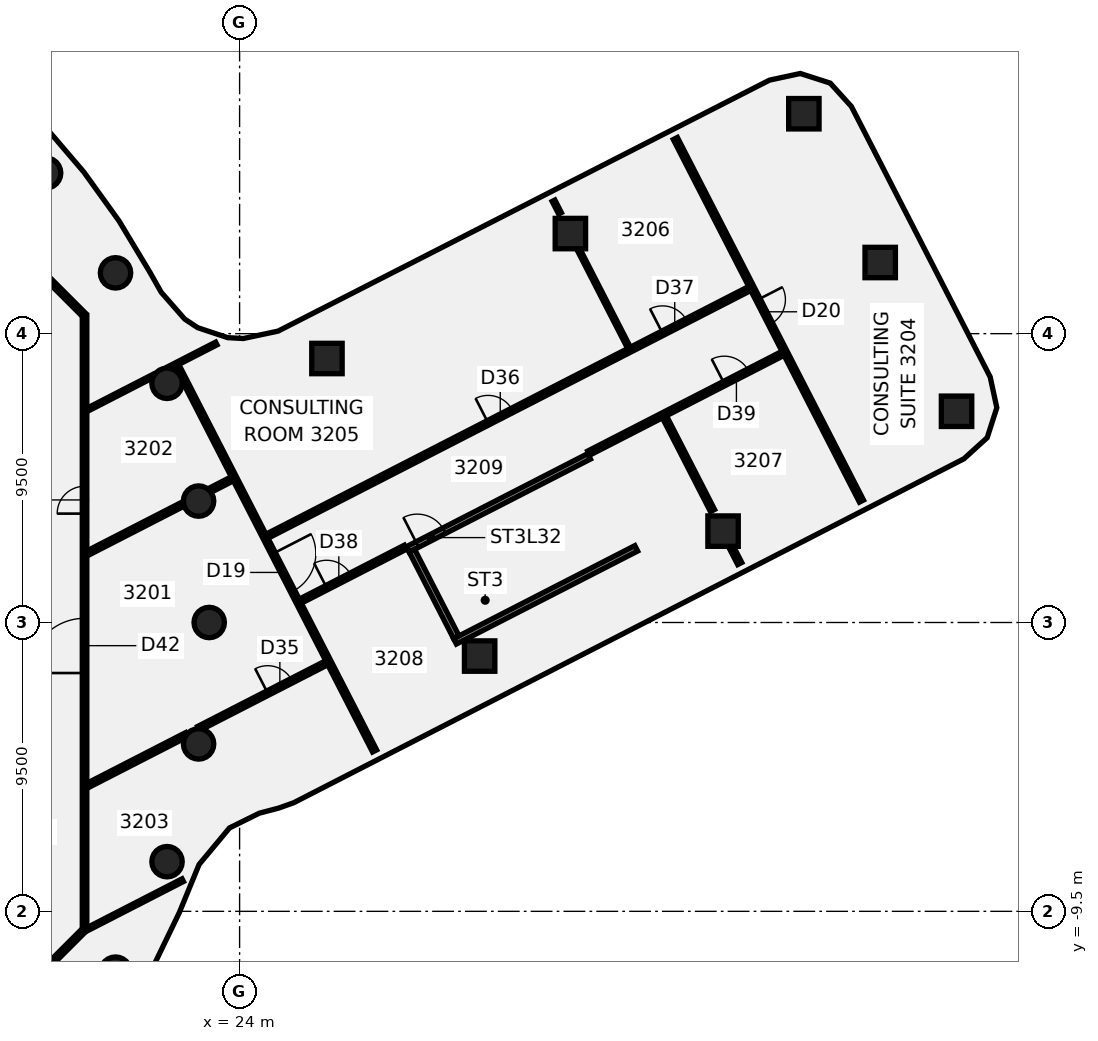
"""IFC4 building model, lengths in metres.
Left out: names, types, materials, properties, quantities, classifications, styles, units other than length and angle.
Written with IfcOpenShell. Run it as: python <this file> out.ifc"""

import sys

from ifc_helpers import new_model, si_unit, direction, frame, frame_2d, origin, origin_2d, place, context, subcontext, project, spatial, polyline, rectangle, circle, outline, extrude, element, fill, save


model = new_model("IFC4")
c1 = context("Model", 3, precision=1e-05, world=origin(), true_north=direction((0.0, 1.0)))
c2 = subcontext(c1, "Body", "Model", "MODEL_VIEW")
j1 = project(units=[si_unit("LENGTHUNIT", "METRE"), si_unit("PLANEANGLEUNIT", "RADIAN")], contexts=[c1])
p1 = place(None, origin())
s1 = spatial("IfcSite", under=j1, at=p1, CompositionType="ELEMENT")
p2 = place(p1, origin())
s2 = spatial("IfcBuilding", under=s1, at=p2, CompositionType="ELEMENT")
p3 = place(p2, frame((0.0, 0.0, 133.0)))
s3 = spatial("IfcBuildingStorey", under=s2, at=p3, CompositionType="ELEMENT", Elevation=133.0)
for number, where, z_axis, x_axis in (
    (1, (23.0, 0.0, -0.14), (0.0, 0.0, 1.0), (1.0, 0.0, 0.0)),
    (2, (22.651, 3.994, -0.14), (0.0, 0.0, 1.0), (1.0, 0.0, 0.0)),
    (3, (21.613, 7.866, -0.14), (0.0, 0.0, 1.0), (1.0, 0.0, 0.0)),
    (4, (19.919, 11.5, -0.14), (0.0, 0.0, 1.0), (1.0, 0.0, 0.0)),
    (5, (17.619, 14.784, -0.14), (0.0, 0.0, 1.0), (1.0, 0.0, 0.0)),
    (6, (19.919, -11.5, -0.14), (0.0, 0.0, 1.0), (1.0, 0.0, 0.0)),
    (7, (21.613, -7.866, -0.14), (0.0, 0.0, 1.0), (1.0, 0.0, 0.0)),
    (8, (22.651, -3.994, -0.14), (0.0, 0.0, 1.0), (1.0, 0.0, 0.0)),
):
    element("IfcColumn", number, at=place(p3, frame(where, z_axis=z_axis, x_axis=x_axis)), inside=s3, PredefinedType="COLUMN", context=c2, shape_type="SweptSolid", body=[
        extrude(circle(Radius=0.5, at=origin_2d()), origin(), (0.0, 0.0, 1.0), 3.75),
    ])
p4 = place(p3, frame((34.88, 12.792, -0.134), z_axis=(-0.062521773916, 0.061871859426, 0.996123938472), x_axis=(0.453556116001, -0.887299968667, 0.083579993069)))
e9 = element("IfcColumn", 9, at=p4, inside=s3, PredefinedType="COLUMN", context=c2, shape_type="SweptSolid", body=[
    extrude(rectangle(XDim=1.0, YDim=1.0, at=origin_2d()), origin(), (0.0, 0.0, 1.0), 3.757),
])
p5 = place(p3, frame((39.903, 3.006, -0.134), z_axis=(-0.015336055459, 0.086557736741, 0.996128788668), x_axis=(-0.889923738813, -0.455375187571, 0.025868468099)))
e10 = element("IfcColumn", 10, at=p5, inside=s3, PredefinedType="COLUMN", context=c2, shape_type="SweptSolid", body=[
    extrude(rectangle(XDim=1.0, YDim=1.0, at=origin_2d()), origin(), (0.0, 0.0, 1.0), 3.757),
])
p6 = place(p3, frame((26.873, 8.683, -0.136), z_axis=(-0.042396721911, 0.023249815242, 0.99883029793), x_axis=(0.45636204272, -0.888891864763, 0.040061686479)))
e11 = element("IfcColumn", 11, at=p6, inside=s3, PredefinedType="COLUMN", context=c2, shape_type="SweptSolid", body=[
    extrude(rectangle(XDim=1.0, YDim=1.0, at=origin_2d()), origin(), (0.0, 0.0, 1.0), 3.749),
])
p7 = place(p3, frame((31.896, -1.104, -0.136), z_axis=(0.004949211766, 0.048124572307, 0.998829079895), x_axis=(-0.889858610868, -0.455474581289, 0.026354477116)))
e12 = element("IfcColumn", 12, at=p7, inside=s3, PredefinedType="COLUMN", context=c2, shape_type="SweptSolid", body=[
    extrude(rectangle(XDim=1.0, YDim=1.0, at=origin_2d()), origin(), (0.0, 0.0, 1.0), 3.749),
])
p8 = place(p3, frame((47.583, 6.947, -0.131), z_axis=(-0.021573490305, 0.130025765362, 0.991275887358), x_axis=(-0.890036848371, -0.454113091891, 0.04019587435)))
e13 = element("IfcColumn", 13, at=p8, inside=s3, PredefinedType="COLUMN", context=c2, shape_type="SweptSolid", body=[
    extrude(rectangle(XDim=1.0, YDim=1.0, at=origin_2d()), origin(), (0.0, 0.0, 1.0), 3.757),
])
p9 = place(p3, frame((45.071, 11.84, -0.133), z_axis=(-0.045053158792, 0.117801332946, 0.992014646484), x_axis=(-0.890031586101, -0.455693217506, 0.013691868468)))
e14 = element("IfcColumn", 14, at=p9, inside=s3, PredefinedType="COLUMN", context=c2, shape_type="SweptSolid", body=[
    extrude(rectangle(XDim=1.0, YDim=1.0, at=origin_2d()), origin(), (0.0, 0.0, 1.0), 3.755),
])
p10 = place(p3, frame((42.56, 16.733, -0.132), z_axis=(-0.068538826824, 0.105474361583, 0.992057250498), x_axis=(0.452121084233, -0.883135905889, 0.125129920171)))
e15 = element("IfcColumn", 15, at=p10, inside=s3, PredefinedType="COLUMN", context=c2, shape_type="SweptSolid", body=[
    extrude(rectangle(XDim=1.0, YDim=1.0, at=origin_2d()), origin(), (0.0, 0.0, 1.0), 3.754),
])
p11 = place(p3, frame((21.934, 8.452, 0.0), z_axis=(0.0, 0.0, 1.0), x_axis=(0.456612291923, -0.889665788296, 0.0)))
e16 = element("IfcWall", 16, at=p11, inside=s3, PredefinedType="PARTITIONING", context=c2, shape_type="SweptSolid", body=[
    extrude(rectangle(XDim=14.249, YDim=0.15, at=frame_2d((7.125, 0.0))), origin(), (0.0, 0.0, 1.0), 3.01),
])
p12 = place(p11, frame((6.95, 0.0, 0.0)))
e17 = element("IfcOpeningElement", 17, at=p12, cuts=e16, PredefinedType="OPENING", context=c2, shape_type="SweptSolid", body=[
    extrude(rectangle(XDim=1.4, YDim=2.1, at=frame_2d((0.7, 1.05))), frame((0.0, 0.085, 0.0), z_axis=(0.0, -1.0, 0.0), x_axis=(1.0, 0.0, 0.0)), (0.0, 0.0, 1.0), 0.17),
])
p13 = place(p3, frame((34.326, 13.872, 0.0), z_axis=(0.0, 0.0, 1.0), x_axis=(0.456625277786, -0.889659123309, 0.0)))
e18 = element("IfcWall", 18, at=p13, inside=s3, PredefinedType="PARTITIONING", context=c2, shape_type="SweptSolid", body=[
    extrude(rectangle(XDim=0.466, YDim=0.1, at=frame_2d((0.233, 0.0))), origin(), (0.0, 0.0, 1.0), 3.01),
])
p14 = place(p3, frame((35.084, 12.396, 0.0), z_axis=(0.0, 0.0, 1.0), x_axis=(0.456567077321, -0.889688992799, 0.0)))
e19 = element("IfcWall", 19, at=p14, inside=s3, PredefinedType="PARTITIONING", context=c2, shape_type="SweptSolid", body=[
    extrude(rectangle(XDim=3.78, YDim=0.1, at=frame_2d((1.89, 0.0))), origin(), (0.0, 0.0, 1.0), 3.01),
])
p15 = place(p3, frame((37.974, 6.764, 0.0), z_axis=(0.0, 0.0, 1.0), x_axis=(0.456549891338, -0.889697812023, 0.0)))
e20 = element("IfcWall", 20, at=p15, inside=s3, PredefinedType="PARTITIONING", context=c2, shape_type="SweptSolid", body=[
    extrude(rectangle(XDim=3.464, YDim=0.15, at=frame_2d((1.732, 0.0))), origin(), (0.0, 0.0, 1.0), 3.01),
])
p16 = place(p3, frame((40.101, 2.619, 0.0), z_axis=(0.0, 0.0, 1.0), x_axis=(0.456381439549, -0.889784233191, 0.0)))
e21 = element("IfcWall", 21, at=p16, inside=s3, PredefinedType="PARTITIONING", context=c2, shape_type="SweptSolid", body=[
    extrude(rectangle(XDim=0.765, YDim=0.15, at=frame_2d((0.382, 0.0))), origin(), (0.0, 0.0, 1.0), 3.01),
])
p17 = place(p3, frame((38.333, 15.919, 0.0), z_axis=(0.0, 0.0, 1.0), x_axis=(0.456630170647, -0.889656611988, 0.0)))
e22 = element("IfcWall", 22, at=p17, inside=s3, PredefinedType="PARTITIONING", context=c2, shape_type="SweptSolid", body=[
    extrude(rectangle(XDim=13.405, YDim=0.15, at=frame_2d((6.703, 0.0))), origin(), (0.0, 0.0, 1.0), 3.01),
])
p18 = place(p17, frame((5.957, 0.0, 0.0)))
e23 = element("IfcOpeningElement", 23, at=p18, cuts=e22, PredefinedType="OPENING", context=c2, shape_type="SweptSolid", body=[
    extrude(rectangle(XDim=0.9, YDim=2.1, at=frame_2d((0.45, 1.05))), frame((0.0, 0.085, 0.0), z_axis=(0.0, -1.0, 0.0), x_axis=(1.0, 0.0, 0.0)), (0.0, 0.0, 1.0), 0.17),
])
p19 = place(p3, frame((17.128, 11.872, 0.0), z_axis=(0.0, 0.0, 1.0), x_axis=(0.707106781187, -0.707106781187, 0.0)))
e24 = element("IfcWall", 24, at=p19, inside=s3, PredefinedType="PARTITIONING", context=c2, shape_type="SweptSolid", body=[
    extrude(rectangle(XDim=2.465, YDim=0.15, at=frame_2d((1.232, 0.0))), origin(), (0.0, 0.0, 1.0), 3.01),
])
p20 = place(p3, frame((18.93, -10.118, 0.0), z_axis=(0.0, 0.0, 1.0), x_axis=(0.889666890189, 0.456610144984, 0.0)))
e25 = element("IfcWall", 25, at=p20, inside=s3, PredefinedType="PARTITIONING", context=c2, shape_type="SweptSolid", body=[
    extrude(rectangle(XDim=3.597, YDim=0.1, at=frame_2d((1.798, 0.0))), origin(), (0.0, 0.0, 1.0), 3.01),
])
p21 = place(p3, frame((18.993, -5.364, 0.0), z_axis=(0.0, 0.0, 1.0), x_axis=(0.889723982038, 0.45649888914, 0.0)))
e26 = element("IfcWall", 26, at=p21, inside=s3, PredefinedType="PARTITIONING", context=c2, shape_type="SweptSolid", body=[
    extrude(rectangle(XDim=3.671, YDim=0.15, at=frame_2d((1.836, 0.0))), origin(), (0.0, 0.0, 1.0), 3.01),
])
p22 = place(p3, frame((22.655, -3.485, 0.0), z_axis=(0.0, 0.0, 1.0), x_axis=(0.88970520017, 0.456535493461, 0.0)))
e27 = element("IfcWall", 27, at=p22, inside=s3, PredefinedType="PARTITIONING", context=c2, shape_type="SweptSolid", body=[
    extrude(rectangle(XDim=4.733, YDim=0.15, at=frame_2d((2.367, 0.0))), origin(), (0.0, 0.0, 1.0), 3.01),
])
p23 = place(p22, frame((2.55, 0.0, 0.0)))
e28 = element("IfcOpeningElement", 28, at=p23, cuts=e27, PredefinedType="OPENING", context=c2, shape_type="SweptSolid", body=[
    extrude(rectangle(XDim=0.9, YDim=2.1, at=frame_2d((0.45, 1.05))), frame((0.0, 0.085, 0.0), z_axis=(0.0, -1.0, 0.0), x_axis=(1.0, 0.0, 0.0)), (0.0, 0.0, 1.0), 0.17),
])
p24 = place(p3, frame((18.993, 2.279, 0.0), z_axis=(0.0, 0.0, 1.0), x_axis=(0.889720446933, 0.456505779054, 0.0)))
e29 = element("IfcWall", 29, at=p24, inside=s3, PredefinedType="PARTITIONING", context=c2, shape_type="SweptSolid", body=[
    extrude(rectangle(XDim=3.564, YDim=0.15, at=frame_2d((1.782, 0.0))), origin(), (0.0, 0.0, 1.0), 3.01),
])
p25 = place(p3, frame((23.004, 4.337, 0.0), z_axis=(0.0, 0.0, 1.0), x_axis=(0.889677168086, 0.456590118802, 0.0)))
e30 = element("IfcWall", 30, at=p25, inside=s3, PredefinedType="PARTITIONING", context=c2, shape_type="SweptSolid", body=[
    extrude(rectangle(XDim=0.852, YDim=0.15, at=frame_2d((0.426, 0.0))), origin(), (0.0, 0.0, 1.0), 3.01),
])
p26 = place(p3, frame((18.98, 6.992, 0.0), z_axis=(0.0, 0.0, 1.0), x_axis=(0.889616028154, 0.456709231845, 0.0)))
e31 = element("IfcWall", 31, at=p26, inside=s3, PredefinedType="PARTITIONING", context=c2, shape_type="SweptSolid", body=[
    extrude(rectangle(XDim=2.462, YDim=0.1, at=frame_2d((1.231, 0.0))), origin(), (0.0, 0.0, 1.0), 3.01),
])
p27 = place(p3, frame((21.655, 8.365, 0.0), z_axis=(0.0, 0.0, 1.0), x_axis=(0.889589674888, 0.456760561271, 0.0)))
e32 = element("IfcWall", 32, at=p27, inside=s3, PredefinedType="PARTITIONING", context=c2, shape_type="SweptSolid", body=[
    extrude(rectangle(XDim=1.775, YDim=0.1, at=frame_2d((0.888, 0.0))), origin(), (0.0, 0.0, 1.0), 3.01),
])
p28 = place(p3, frame((24.904, 2.84, 0.0), z_axis=(0.0, 0.0, 1.0), x_axis=(0.88972158157, 0.456503567663, 0.0)))
e33 = element("IfcWall", 33, at=p28, inside=s3, PredefinedType="PARTITIONING", context=c2, shape_type="SweptSolid", body=[
    extrude(rectangle(XDim=17.845, YDim=0.15, at=frame_2d((8.922, 0.0))), origin(), (0.0, 0.0, 1.0), 3.01),
])
p29 = place(p28, frame((8.17, 0.0, 0.0)))
e34 = element("IfcOpeningElement", 34, at=p29, cuts=e33, PredefinedType="OPENING", context=c2, shape_type="SweptSolid", body=[
    extrude(rectangle(XDim=0.9, YDim=2.1, at=frame_2d((0.45, 1.05))), frame((0.0, 0.085, 0.0), z_axis=(0.0, -1.0, 0.0), x_axis=(1.0, 0.0, 0.0)), (0.0, 0.0, 1.0), 0.17),
])
p30 = place(p28, frame((14.62, 0.0, 0.0)))
e35 = element("IfcOpeningElement", 35, at=p30, cuts=e33, PredefinedType="OPENING", context=c2, shape_type="SweptSolid", body=[
    extrude(rectangle(XDim=0.9, YDim=2.1, at=frame_2d((0.45, 1.05))), frame((0.0, 0.085, 0.0), z_axis=(0.0, -1.0, 0.0), x_axis=(1.0, 0.0, 0.0)), (0.0, 0.0, 1.0), 0.17),
])
p31 = place(p3, frame((26.0, 0.704, 0.0), z_axis=(0.0, 0.0, 1.0), x_axis=(0.88964509862, 0.456652601548, 0.0)))
e36 = element("IfcWall", 36, at=p31, inside=s3, PredefinedType="PARTITIONING", context=c2, shape_type="SweptSolid", body=[
    extrude(rectangle(XDim=3.88, YDim=0.15, at=frame_2d((1.94, 0.0))), origin(), (0.0, 0.0, 1.0), 3.01),
])
p32 = place(p31, frame((0.97, 0.0, 0.0)))
e37 = element("IfcOpeningElement", 37, at=p32, cuts=e36, PredefinedType="OPENING", context=c2, shape_type="SweptSolid", body=[
    extrude(rectangle(XDim=0.9, YDim=2.1, at=frame_2d((0.45, 1.05))), frame((0.0, 0.085, 0.0), z_axis=(0.0, -1.0, 0.0), x_axis=(1.0, 0.0, 0.0)), (0.0, 0.0, 1.0), 0.17),
])
p33 = place(p3, frame((35.484, 5.572, 0.0), z_axis=(0.0, 0.0, 1.0), x_axis=(0.889646871899, 0.456649146852, 0.0)))
e38 = element("IfcWall", 38, at=p33, inside=s3, PredefinedType="PARTITIONING", context=c2, shape_type="SweptSolid", body=[
    extrude(rectangle(XDim=7.184, YDim=0.15, at=frame_2d((3.592, 0.0))), origin(), (0.0, 0.0, 1.0), 3.01),
])
p34 = place(p33, frame((5.01, 0.0, 0.0)))
e39 = element("IfcOpeningElement", 39, at=p34, cuts=e38, PredefinedType="OPENING", context=c2, shape_type="SweptSolid", body=[
    extrude(rectangle(XDim=0.9, YDim=2.1, at=frame_2d((0.45, 1.05))), frame((0.0, 0.085, 0.0), z_axis=(0.0, -1.0, 0.0), x_axis=(1.0, 0.0, 0.0)), (0.0, 0.0, 1.0), 0.17),
])
p35 = place(p3, frame((17.1, -11.9, 0.0), z_axis=(0.0, 0.0, 1.0), x_axis=(0.707106781187, 0.707106781187, 0.0)))
e40 = element("IfcWall", 40, at=p35, inside=s3, PredefinedType="PARTITIONING", context=c2, shape_type="SweptSolid", body=[
    extrude(rectangle(XDim=2.505, YDim=0.15, at=frame_2d((1.253, 0.0))), origin(), (0.0, 0.0, 1.0), 3.01),
])
p36 = place(p3, frame((18.9, -10.1, 0.0), z_axis=(0.0, 0.0, 1.0), x_axis=(0.0, 1.0, 0.0)))
e41 = element("IfcWall", 41, at=p36, inside=s3, PredefinedType="PARTITIONING", context=c2, shape_type="SweptSolid", body=[
    extrude(rectangle(XDim=20.2, YDim=0.15, at=frame_2d((10.1, 0.0))), origin(), (0.0, 0.0, 1.0), 3.01),
])
p37 = place(p36, frame((8.438, 0.0, 0.0)))
e42 = element("IfcOpeningElement", 42, at=p37, cuts=e41, PredefinedType="OPENING", context=c2, shape_type="SweptSolid", body=[
    extrude(rectangle(XDim=1.8, YDim=2.1, at=frame_2d((0.9, 1.05))), frame((0.0, 0.085, 0.0), z_axis=(0.0, -1.0, 0.0), x_axis=(1.0, 0.0, 0.0)), (0.0, 0.0, 1.0), 0.17),
])
p38 = place(p36, frame((13.681, 0.0, 0.0)))
e43 = element("IfcOpeningElement", 43, at=p38, cuts=e41, PredefinedType="OPENING", context=c2, shape_type="SweptSolid", body=[
    extrude(rectangle(XDim=0.9, YDim=2.1, at=frame_2d((0.45, 1.05))), frame((0.0, 0.085, 0.0), z_axis=(0.0, -1.0, 0.0), x_axis=(1.0, 0.0, 0.0)), (0.0, 0.0, 1.0), 0.17),
])
p39 = place(p3, frame((29.533, 2.405, -0.14), z_axis=(0.0, 0.0, 1.0), x_axis=(0.889699446703, 0.456546705756, 0.0)))
e44 = element("IfcWall", 44, at=p39, inside=s3, PredefinedType="SHEAR", context=c2, shape_type="SweptSolid", body=[
    extrude(rectangle(XDim=6.7, YDim=0.2, at=frame_2d((3.35, 0.0))), origin(), (0.0, 0.0, 1.0), 3.15),
])
p40 = place(p39, frame((0.35, 0.0, 0.0)))
e45 = element("IfcOpeningElement", 45, at=p40, cuts=e44, PredefinedType="OPENING", context=c2, shape_type="SweptSolid", body=[
    extrude(rectangle(XDim=1.0, YDim=2.1, at=frame_2d((0.5, 1.05))), frame((0.0, 0.11, 0.0), z_axis=(0.0, -1.0, 0.0), x_axis=(1.0, 0.0, 0.0)), (0.0, 0.0, 1.0), 0.22),
])
p41 = place(p3, frame((31.085, -0.621, -0.14), z_axis=(0.0, 0.0, 1.0), x_axis=(0.889684645268, 0.456575549033, 0.0)))
e46 = element("IfcWall", 46, at=p41, inside=s3, PredefinedType="SHEAR", context=c2, shape_type="SweptSolid", body=[
    extrude(rectangle(XDim=6.7, YDim=0.2, at=frame_2d((3.35, 0.0))), origin(), (0.0, 0.0, 1.0), 3.15),
])
p42 = place(p3, frame((31.129, -0.486, -0.14), z_axis=(0.0, 0.0, 1.0), x_axis=(-0.456558269459, 0.889693512727, 0.0)))
e47 = element("IfcWall", 47, at=p42, inside=s3, PredefinedType="SHEAR", context=c2, shape_type="SweptSolid", body=[
    extrude(rectangle(XDim=3.2, YDim=0.2, at=frame_2d((1.6, 0.0))), origin(), (0.0, 0.0, 1.0), 3.15),
])
p43 = place(p3, frame((0.0, 0.0, -0.14)))
e48 = element("IfcWall", 48, at=p43, inside=s3, PredefinedType="SHEAR", context=c2, shape_type="SweptSolid", body=[
    extrude(outline(polyline([(36.823, 2.436), (37.001, 2.527), (35.54, 5.375), (35.362, 5.283), (36.823, 2.436)])), origin(), (0.0, 0.0, 1.0), 3.15),
])
p44 = place(p12, frame((1.4, 0.0, 0.0), z_axis=(0.0, 0.0, 1.0), x_axis=(-1.0, 0.0, 0.0)))
e49 = element("IfcDoor", 49, at=p44, inside=s3, OperationType="DOUBLE_DOOR_SINGLE_SWING", PredefinedType="DOOR", context=c2, shape_type="SweptSolid", body=[
    extrude(rectangle(XDim=1.4, YDim=2.1, at=frame_2d((0.7, 1.05))), frame((0.0, 0.025, 0.0), z_axis=(0.0, -1.0, 0.0), x_axis=(1.0, 0.0, 0.0)), (0.0, 0.0, 1.0), 0.05),
])
fill(e17, e49)
p45 = place(p18, origin())
e50 = element("IfcDoor", 50, at=p45, inside=s3, OperationType="SINGLE_SWING_RIGHT", PredefinedType="DOOR", context=c2, shape_type="SweptSolid", body=[
    extrude(rectangle(XDim=0.9, YDim=2.1, at=frame_2d((0.45, 1.05))), frame((0.0, 0.025, 0.0), z_axis=(0.0, -1.0, 0.0), x_axis=(1.0, 0.0, 0.0)), (0.0, 0.0, 1.0), 0.05),
])
fill(e23, e50)
p46 = place(p23, frame((0.9, 0.0, 0.0), z_axis=(0.0, 0.0, 1.0), x_axis=(-1.0, 0.0, 0.0)))
e51 = element("IfcDoor", 51, at=p46, inside=s3, OperationType="SINGLE_SWING_RIGHT", PredefinedType="DOOR", context=c2, shape_type="SweptSolid", body=[
    extrude(rectangle(XDim=0.9, YDim=2.1, at=frame_2d((0.45, 1.05))), frame((0.0, 0.025, 0.0), z_axis=(0.0, -1.0, 0.0), x_axis=(1.0, 0.0, 0.0)), (0.0, 0.0, 1.0), 0.05),
])
fill(e28, e51)
p47 = place(p29, origin())
e52 = element("IfcDoor", 52, at=p47, inside=s3, OperationType="SINGLE_SWING_RIGHT", PredefinedType="DOOR", context=c2, shape_type="SweptSolid", body=[
    extrude(rectangle(XDim=0.9, YDim=2.1, at=frame_2d((0.45, 1.05))), frame((0.0, 0.025, 0.0), z_axis=(0.0, -1.0, 0.0), x_axis=(1.0, 0.0, 0.0)), (0.0, 0.0, 1.0), 0.05),
])
fill(e34, e52)
p48 = place(p30, origin())
e53 = element("IfcDoor", 53, at=p48, inside=s3, OperationType="SINGLE_SWING_LEFT", PredefinedType="DOOR", context=c2, shape_type="SweptSolid", body=[
    extrude(rectangle(XDim=0.9, YDim=2.1, at=frame_2d((0.45, 1.05))), frame((0.0, 0.025, 0.0), z_axis=(0.0, -1.0, 0.0), x_axis=(1.0, 0.0, 0.0)), (0.0, 0.0, 1.0), 0.05),
])
fill(e35, e53)
p49 = place(p32, frame((0.9, 0.0, 0.0), z_axis=(0.0, 0.0, 1.0), x_axis=(-1.0, 0.0, 0.0)))
e54 = element("IfcDoor", 54, at=p49, inside=s3, OperationType="SINGLE_SWING_LEFT", PredefinedType="DOOR", context=c2, shape_type="SweptSolid", body=[
    extrude(rectangle(XDim=0.9, YDim=2.1, at=frame_2d((0.45, 1.05))), frame((0.0, 0.025, 0.0), z_axis=(0.0, -1.0, 0.0), x_axis=(1.0, 0.0, 0.0)), (0.0, 0.0, 1.0), 0.05),
])
fill(e37, e54)
p50 = place(p34, frame((0.9, 0.0, 0.0), z_axis=(0.0, 0.0, 1.0), x_axis=(-1.0, 0.0, 0.0)))
e55 = element("IfcDoor", 55, at=p50, inside=s3, OperationType="SINGLE_SWING_RIGHT", PredefinedType="DOOR", context=c2, shape_type="SweptSolid", body=[
    extrude(rectangle(XDim=0.9, YDim=2.1, at=frame_2d((0.45, 1.05))), frame((0.0, 0.025, 0.0), z_axis=(0.0, -1.0, 0.0), x_axis=(1.0, 0.0, 0.0)), (0.0, 0.0, 1.0), 0.05),
])
fill(e39, e55)
p51 = place(p37, origin())
e56 = element("IfcDoor", 56, at=p51, inside=s3, OperationType="DOUBLE_DOOR_SINGLE_SWING", PredefinedType="DOOR", context=c2, shape_type="SweptSolid", body=[
    extrude(rectangle(XDim=1.8, YDim=2.1, at=frame_2d((0.9, 1.05))), frame((0.0, 0.025, 0.0), z_axis=(0.0, -1.0, 0.0), x_axis=(1.0, 0.0, 0.0)), (0.0, 0.0, 1.0), 0.05),
])
fill(e42, e56)
p52 = place(p38, frame((0.9, 0.0, 0.0), z_axis=(0.0, 0.0, 1.0), x_axis=(-1.0, 0.0, 0.0)))
e57 = element("IfcDoor", 57, at=p52, inside=s3, OperationType="SINGLE_SWING_RIGHT", PredefinedType="DOOR", context=c2, shape_type="SweptSolid", body=[
    extrude(rectangle(XDim=0.9, YDim=2.1, at=frame_2d((0.45, 1.05))), frame((0.0, 0.025, 0.0), z_axis=(0.0, -1.0, 0.0), x_axis=(1.0, 0.0, 0.0)), (0.0, 0.0, 1.0), 0.05),
])
fill(e43, e57)
p53 = place(p40, origin())
e58 = element("IfcDoor", 58, at=p53, inside=s3, OperationType="SINGLE_SWING_LEFT", PredefinedType="DOOR", context=c2, shape_type="SweptSolid", body=[
    extrude(rectangle(XDim=1.0, YDim=2.1, at=frame_2d((0.5, 1.05))), frame((0.0, 0.025, 0.0), z_axis=(0.0, -1.0, 0.0), x_axis=(1.0, 0.0, 0.0)), (0.0, 0.0, 1.0), 0.05),
])
fill(e45, e58)
save(model, sys.argv[1])
